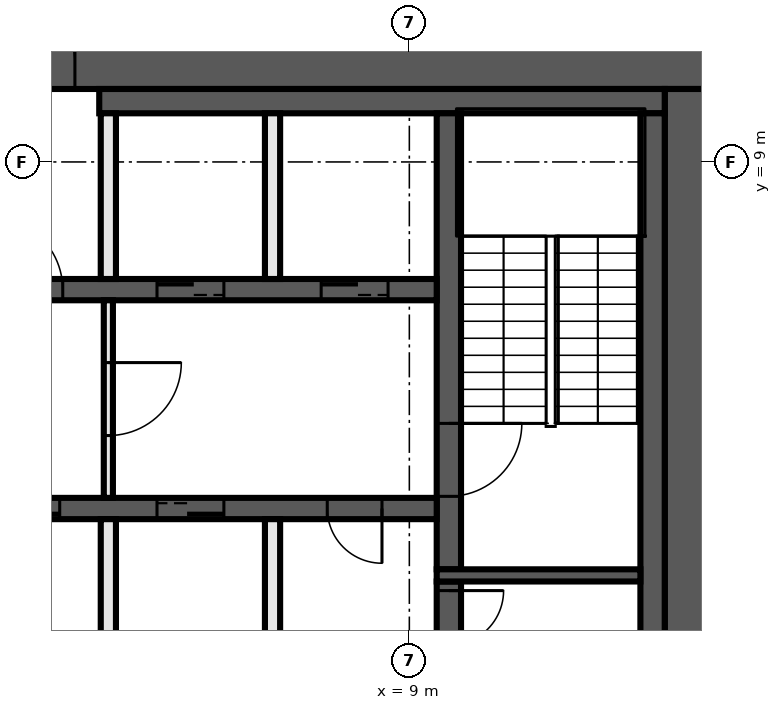
"""IFC4 building model, lengths in metres.
Left out: names, types, materials, properties, quantities, classifications, styles, units other than length and angle.
Written with IfcOpenShell. Run it as: python <this file> out.ifc"""

import sys

from ifc_helpers import new_model, si_unit, direction, frame, frame_2d, origin, place, context, subcontext, project, spatial, rectangle, extrude, element, fill, save


model = new_model("IFC4")
c1 = context("Model", 3, precision=1e-05, world=origin(), true_north=direction((0.0, 1.0)))
c2 = subcontext(c1, "Body", "Model", "MODEL_VIEW")
j1 = project(units=[si_unit("LENGTHUNIT", "METRE"), si_unit("PLANEANGLEUNIT", "RADIAN")], contexts=[c1])
p1 = place(None, origin())
s1 = spatial("IfcSite", under=j1, at=p1, CompositionType="ELEMENT")
p2 = place(p1, origin())
s2 = spatial("IfcBuilding", under=s1, at=p2, CompositionType="ELEMENT")
p3 = place(p2, frame((0.0, 0.0, 211.4)))
s3 = spatial("IfcBuildingStorey", under=s2, at=p3, CompositionType="ELEMENT", Elevation=211.4)
p4 = place(p3, frame((-14.0, 10.6, 0.0), z_axis=(0.0, 0.0, 1.0), x_axis=(1.0, 0.0, 0.0)))
e1 = element("IfcWall", 1, at=p4, inside=s3, PredefinedType="SHEAR", context=c2, shape_type="SweptSolid", body=[
    extrude(rectangle(XDim=28.0, YDim=0.8, at=frame_2d((14.0, 0.0))), origin(), (0.0, 0.0, 1.0), 3.82),
])
p5 = place(p4, frame((15.9, 0.0, 0.0)))
e2 = element("IfcOpeningElement", 2, at=p5, cuts=e1, PredefinedType="OPENING", context=c2, shape_type="SweptSolid", body=[
    extrude(rectangle(XDim=1.6, YDim=2.1, at=frame_2d((0.8, 1.05))), frame((0.0, 0.41, 0.0), z_axis=(0.0, -1.0, 0.0), x_axis=(1.0, 0.0, 0.0)), (0.0, 0.0, 1.0), 0.82),
])
p6 = place(p3, frame((13.6, 10.2, 0.0), z_axis=(0.0, 0.0, 1.0), x_axis=(0.0, -1.0, 0.0)))
e3 = element("IfcWall", 3, at=p6, inside=s3, PredefinedType="SHEAR", context=c2, shape_type="SweptSolid", body=[
    extrude(rectangle(XDim=20.4, YDim=0.8, at=frame_2d((10.2, 0.0))), origin(), (0.0, 0.0, 1.0), 3.82),
])
p7 = place(p3, frame((3.9, 10.0, 0.0), z_axis=(0.0, 0.0, 1.0), x_axis=(1.0, 0.0, 0.0)))
e4 = element("IfcWall", 4, at=p7, inside=s3, PredefinedType="SHEAR", context=c2, shape_type="SweptSolid", body=[
    extrude(rectangle(XDim=9.3, YDim=0.4, at=frame_2d((4.65, 0.0))), origin(), (0.0, 0.0, 1.0), 3.82),
])
p8 = place(p3, frame((13.0, 9.8, 0.0), z_axis=(0.0, 0.0, 1.0), x_axis=(0.0, -1.0, 0.0)))
e5 = element("IfcWall", 5, at=p8, inside=s3, PredefinedType="SHEAR", context=c2, shape_type="SweptSolid", body=[
    extrude(rectangle(XDim=19.6, YDim=0.4, at=frame_2d((9.8, 0.0))), origin(), (0.0, 0.0, 1.0), 3.82),
])
p9 = place(p3, frame((9.65, 2.1, 0.0), z_axis=(0.0, 0.0, 1.0), x_axis=(0.0, -1.0, 0.0)))
e6 = element("IfcWall", 6, at=p9, inside=s3, PredefinedType="SHEAR", context=c2, shape_type="SweptSolid", body=[
    extrude(rectangle(XDim=4.2, YDim=0.4, at=frame_2d((2.1, 0.0))), origin(), (0.0, 0.0, 1.0), 3.82),
])
p10 = place(p9, frame((0.15, 0.0, 0.0)))
e7 = element("IfcOpeningElement", 7, at=p10, cuts=e6, PredefinedType="OPENING", context=c2, shape_type="SweptSolid", body=[
    extrude(rectangle(XDim=0.9, YDim=2.1, at=frame_2d((0.45, 1.05))), frame((0.0, 0.21, 0.0), z_axis=(0.0, -1.0, 0.0), x_axis=(1.0, 0.0, 0.0)), (0.0, 0.0, 1.0), 0.42),
])
p11 = place(p3, frame((9.65, 9.8, 0.0), z_axis=(0.0, 0.0, 1.0), x_axis=(0.0, -1.0, 0.0)))
e8 = element("IfcWall", 8, at=p11, inside=s3, PredefinedType="SHEAR", context=c2, shape_type="SweptSolid", body=[
    extrude(rectangle(XDim=7.5, YDim=0.4, at=frame_2d((3.75, 0.0))), origin(), (0.0, 0.0, 1.0), 3.82),
])
p12 = place(p11, frame((5.1, 0.0, 0.0)))
e9 = element("IfcOpeningElement", 9, at=p12, cuts=e8, PredefinedType="OPENING", context=c2, shape_type="SweptSolid", body=[
    extrude(rectangle(XDim=1.2, YDim=2.1, at=frame_2d((0.6, 1.05))), frame((0.0, 0.21, 0.0), z_axis=(0.0, -1.0, 0.0), x_axis=(1.0, 0.0, 0.0)), (0.0, 0.0, 1.0), 0.42),
])
p13 = place(p3, frame((9.45, 2.2, 0.0), z_axis=(0.0, 0.0, 1.0), x_axis=(1.0, 0.0, 0.0)))
e10 = element("IfcWall", 10, at=p13, inside=s3, PredefinedType="SHEAR", context=c2, shape_type="SweptSolid", body=[
    extrude(rectangle(XDim=3.35, YDim=0.2, at=frame_2d((1.675, 0.0))), origin(), (0.0, 0.0, 1.0), 3.82),
])
p14 = place(p3, frame((-9.45, 6.9, 0.0), z_axis=(0.0, 0.0, 1.0), x_axis=(1.0, 0.0, 0.0)))
e11 = element("IfcWall", 11, at=p14, inside=s3, PredefinedType="SHEAR", context=c2, shape_type="SweptSolid", body=[
    extrude(rectangle(XDim=18.9, YDim=0.35, at=frame_2d((9.45, 0.0))), origin(), (0.0, 0.0, 1.0), 3.82),
])
p15 = place(p14, frame((11.55, 0.0, 0.0)))
e12 = element("IfcOpeningElement", 12, at=p15, cuts=e11, PredefinedType="OPENING", context=c2, shape_type="SweptSolid", body=[
    extrude(rectangle(XDim=1.2, YDim=2.1, at=frame_2d((0.6, 1.05))), frame((0.0, 0.185, 0.0), z_axis=(0.0, -1.0, 0.0), x_axis=(1.0, 0.0, 0.0)), (0.0, 0.0, 1.0), 0.37),
])
p16 = place(p14, frame((14.3, 0.0, 0.0)))
e13 = element("IfcOpeningElement", 13, at=p16, cuts=e11, PredefinedType="OPENING", context=c2, shape_type="SweptSolid", body=[
    extrude(rectangle(XDim=1.1, YDim=2.1, at=frame_2d((0.55, 1.05))), frame((0.0, 0.185, 0.0), z_axis=(0.0, -1.0, 0.0), x_axis=(1.0, 0.0, 0.0)), (0.0, 0.0, 1.0), 0.37),
])
p17 = place(p14, frame((17.0, 0.0, 0.0)))
e14 = element("IfcOpeningElement", 14, at=p17, cuts=e11, PredefinedType="OPENING", context=c2, shape_type="SweptSolid", body=[
    extrude(rectangle(XDim=1.1, YDim=2.1, at=frame_2d((0.55, 1.05))), frame((0.0, 0.185, 0.0), z_axis=(0.0, -1.0, 0.0), x_axis=(1.0, 0.0, 0.0)), (0.0, 0.0, 1.0), 0.37),
])
p18 = place(p14, frame((2.25, 0.0, 0.0)))
e15 = element("IfcOpeningElement", 15, at=p18, cuts=e11, PredefinedType="OPENING", context=c2, shape_type="SweptSolid", body=[
    extrude(rectangle(XDim=0.9, YDim=2.1, at=frame_2d((0.45, 1.05))), frame((0.0, 0.185, 0.0), z_axis=(0.0, -1.0, 0.0), x_axis=(1.0, 0.0, 0.0)), (0.0, 0.0, 1.0), 0.37),
])
p19 = place(p14, frame((6.3, 0.0, 0.0)))
e16 = element("IfcOpeningElement", 16, at=p19, cuts=e11, PredefinedType="OPENING", context=c2, shape_type="SweptSolid", body=[
    extrude(rectangle(XDim=0.9, YDim=2.1, at=frame_2d((0.45, 1.05))), frame((0.0, 0.185, 0.0), z_axis=(0.0, -1.0, 0.0), x_axis=(1.0, 0.0, 0.0)), (0.0, 0.0, 1.0), 0.37),
])
p20 = place(p14, frame((9.0, 0.0, 0.0)))
e17 = element("IfcOpeningElement", 17, at=p20, cuts=e11, PredefinedType="OPENING", context=c2, shape_type="SweptSolid", body=[
    extrude(rectangle(XDim=0.9, YDim=2.1, at=frame_2d((0.45, 1.05))), frame((0.0, 0.185, 0.0), z_axis=(0.0, -1.0, 0.0), x_axis=(1.0, 0.0, 0.0)), (0.0, 0.0, 1.0), 0.37),
])
p21 = place(p3, frame((9.45, 3.3, 0.0), z_axis=(0.0, 0.0, 1.0), x_axis=(-1.0, 0.0, 0.0)))
e18 = element("IfcWall", 18, at=p21, inside=s3, PredefinedType="SHEAR", context=c2, shape_type="SweptSolid", body=[
    extrude(rectangle(XDim=18.9, YDim=0.35, at=frame_2d((9.45, 0.0))), origin(), (0.0, 0.0, 1.0), 3.82),
])
p22 = place(p21, frame((6.2, 0.0, 0.0)))
e19 = element("IfcOpeningElement", 19, at=p22, cuts=e18, PredefinedType="OPENING", context=c2, shape_type="SweptSolid", body=[
    extrude(rectangle(XDim=1.1, YDim=2.1, at=frame_2d((0.55, 1.05))), frame((0.0, 0.185, 0.0), z_axis=(0.0, -1.0, 0.0), x_axis=(1.0, 0.0, 0.0)), (0.0, 0.0, 1.0), 0.37),
])
p23 = place(p21, frame((3.5, 0.0, 0.0)))
e20 = element("IfcOpeningElement", 20, at=p23, cuts=e18, PredefinedType="OPENING", context=c2, shape_type="SweptSolid", body=[
    extrude(rectangle(XDim=1.1, YDim=2.1, at=frame_2d((0.55, 1.05))), frame((0.0, 0.185, 0.0), z_axis=(0.0, -1.0, 0.0), x_axis=(1.0, 0.0, 0.0)), (0.0, 0.0, 1.0), 0.37),
])
p24 = place(p21, frame((0.9, 0.0, 0.0)))
e21 = element("IfcOpeningElement", 21, at=p24, cuts=e18, PredefinedType="OPENING", context=c2, shape_type="SweptSolid", body=[
    extrude(rectangle(XDim=0.9, YDim=2.1, at=frame_2d((0.45, 1.05))), frame((0.0, 0.185, 0.0), z_axis=(0.0, -1.0, 0.0), x_axis=(1.0, 0.0, 0.0)), (0.0, 0.0, 1.0), 0.37),
])
p25 = place(p21, frame((17.1, 0.0, 0.0)))
e22 = element("IfcOpeningElement", 22, at=p25, cuts=e18, PredefinedType="OPENING", context=c2, shape_type="SweptSolid", body=[
    extrude(rectangle(XDim=0.9, YDim=2.1, at=frame_2d((0.45, 1.05))), frame((0.0, 0.185, 0.0), z_axis=(0.0, -1.0, 0.0), x_axis=(1.0, 0.0, 0.0)), (0.0, 0.0, 1.0), 0.37),
])
p26 = place(p21, frame((14.4, 0.0, 0.0)))
e23 = element("IfcOpeningElement", 23, at=p26, cuts=e18, PredefinedType="OPENING", context=c2, shape_type="SweptSolid", body=[
    extrude(rectangle(XDim=0.9, YDim=2.1, at=frame_2d((0.45, 1.05))), frame((0.0, 0.185, 0.0), z_axis=(0.0, -1.0, 0.0), x_axis=(1.0, 0.0, 0.0)), (0.0, 0.0, 1.0), 0.37),
])
p27 = place(p21, frame((10.35, 0.0, 0.0)))
e24 = element("IfcOpeningElement", 24, at=p27, cuts=e18, PredefinedType="OPENING", context=c2, shape_type="SweptSolid", body=[
    extrude(rectangle(XDim=0.9, YDim=2.1, at=frame_2d((0.45, 1.05))), frame((0.0, 0.185, 0.0), z_axis=(0.0, -1.0, 0.0), x_axis=(1.0, 0.0, 0.0)), (0.0, 0.0, 1.0), 0.37),
])
for number, where, z_axis, x_axis in (
    (25, (6.75, 0.4, 0.0), (0.0, 0.0, 1.0), (0.0, 1.0, 0.0)),
    (26, (6.75, 7.075, 0.0), (0.0, 0.0, 1.0), (0.0, 1.0, 0.0)),
):
    element("IfcWall", number, at=place(p3, frame(where, z_axis=z_axis, x_axis=x_axis)), inside=s3, PredefinedType="SOLIDWALL", context=c2, shape_type="SweptSolid", body=[
        extrude(rectangle(XDim=2.725, YDim=0.25, at=frame_2d((1.363, 0.0))), origin(), (0.0, 0.0, 1.0), 3.82),
    ])
p28 = place(p3, frame((4.05, 6.725, 0.0), z_axis=(0.0, 0.0, 1.0), x_axis=(0.0, -1.0, 0.0)))
e27 = element("IfcWall", 27, at=p28, inside=s3, PredefinedType="PARTITIONING", context=c2, shape_type="SweptSolid", body=[
    extrude(rectangle(XDim=3.25, YDim=0.15, at=frame_2d((1.625, 0.0))), origin(), (0.0, 0.0, 1.0), 3.82),
])
p29 = place(p28, frame((1.025, 0.0, 0.0)))
e28 = element("IfcOpeningElement", 28, at=p29, cuts=e27, PredefinedType="OPENING", context=c2, shape_type="SweptSolid", body=[
    extrude(rectangle(XDim=1.2, YDim=2.1, at=frame_2d((0.6, 1.05))), frame((0.0, 0.085, 0.0), z_axis=(0.0, -1.0, 0.0), x_axis=(1.0, 0.0, 0.0)), (0.0, 0.0, 1.0), 0.17),
])
for number, where, z_axis, x_axis in (
    (29, (4.05, 0.4, 0.0), (0.0, 0.0, 1.0), (0.0, 1.0, 0.0)),
    (30, (4.05, 7.075, 0.0), (0.0, 0.0, 1.0), (0.0, 1.0, 0.0)),
):
    element("IfcWall", number, at=place(p3, frame(where, z_axis=z_axis, x_axis=x_axis)), inside=s3, PredefinedType="SOLIDWALL", context=c2, shape_type="SweptSolid", body=[
        extrude(rectangle(XDim=2.725, YDim=0.25, at=frame_2d((1.363, 0.0))), origin(), (0.0, 0.0, 1.0), 3.82),
    ])
p30 = place(p10, origin())
e31 = element("IfcDoor", 31, at=p30, inside=s3, OperationType="SINGLE_SWING_RIGHT", PredefinedType="DOOR", context=c2, shape_type="SweptSolid", body=[
    extrude(rectangle(XDim=0.9, YDim=2.1, at=frame_2d((0.45, 1.05))), frame((0.0, 0.025, 0.0), z_axis=(0.0, -1.0, 0.0), x_axis=(1.0, 0.0, 0.0)), (0.0, 0.0, 1.0), 0.05),
])
fill(e7, e31)
p31 = place(p5, origin())
e32 = element("IfcDoor", 32, at=p31, inside=s3, OperationType="DOUBLE_DOOR_SINGLE_SWING", PredefinedType="DOOR", context=c2, shape_type="SweptSolid", body=[
    extrude(rectangle(XDim=1.6, YDim=2.1, at=frame_2d((0.8, 1.05))), frame((0.0, 0.025, 0.0), z_axis=(0.0, -1.0, 0.0), x_axis=(1.0, 0.0, 0.0)), (0.0, 0.0, 1.0), 0.05),
])
fill(e2, e32)
p32 = place(p15, origin())
e33 = element("IfcDoor", 33, at=p32, inside=s3, OperationType="SINGLE_SWING_LEFT", PredefinedType="DOOR", context=c2, shape_type="SweptSolid", body=[
    extrude(rectangle(XDim=1.2, YDim=2.1, at=frame_2d((0.6, 1.05))), frame((0.0, 0.025, 0.0), z_axis=(0.0, -1.0, 0.0), x_axis=(1.0, 0.0, 0.0)), (0.0, 0.0, 1.0), 0.05),
])
fill(e12, e33)
p33 = place(p16, origin())
e34 = element("IfcDoor", 34, at=p33, inside=s3, OperationType="DOUBLE_DOOR_SLIDING", PredefinedType="DOOR", context=c2, shape_type="SweptSolid", body=[
    extrude(rectangle(XDim=1.1, YDim=2.1, at=frame_2d((0.55, 1.05))), frame((0.0, 0.025, 0.0), z_axis=(0.0, -1.0, 0.0), x_axis=(1.0, 0.0, 0.0)), (0.0, 0.0, 1.0), 0.05),
])
fill(e13, e34)
p34 = place(p17, origin())
e35 = element("IfcDoor", 35, at=p34, inside=s3, OperationType="DOUBLE_DOOR_SLIDING", PredefinedType="DOOR", context=c2, shape_type="SweptSolid", body=[
    extrude(rectangle(XDim=1.1, YDim=2.1, at=frame_2d((0.55, 1.05))), frame((0.0, 0.025, 0.0), z_axis=(0.0, -1.0, 0.0), x_axis=(1.0, 0.0, 0.0)), (0.0, 0.0, 1.0), 0.05),
])
fill(e14, e35)
p35 = place(p22, origin())
e36 = element("IfcDoor", 36, at=p35, inside=s3, OperationType="DOUBLE_DOOR_SLIDING", PredefinedType="DOOR", context=c2, shape_type="SweptSolid", body=[
    extrude(rectangle(XDim=1.1, YDim=2.1, at=frame_2d((0.55, 1.05))), frame((0.0, 0.025, 0.0), z_axis=(0.0, -1.0, 0.0), x_axis=(1.0, 0.0, 0.0)), (0.0, 0.0, 1.0), 0.05),
])
fill(e19, e36)
p36 = place(p23, origin())
e37 = element("IfcDoor", 37, at=p36, inside=s3, OperationType="DOUBLE_DOOR_SLIDING", PredefinedType="DOOR", context=c2, shape_type="SweptSolid", body=[
    extrude(rectangle(XDim=1.1, YDim=2.1, at=frame_2d((0.55, 1.05))), frame((0.0, 0.025, 0.0), z_axis=(0.0, -1.0, 0.0), x_axis=(1.0, 0.0, 0.0)), (0.0, 0.0, 1.0), 0.05),
])
fill(e20, e37)
p37 = place(p24, origin())
e38 = element("IfcDoor", 38, at=p37, inside=s3, OperationType="SINGLE_SWING_LEFT", PredefinedType="DOOR", context=c2, shape_type="SweptSolid", body=[
    extrude(rectangle(XDim=0.9, YDim=2.1, at=frame_2d((0.45, 1.05))), frame((0.0, 0.025, 0.0), z_axis=(0.0, -1.0, 0.0), x_axis=(1.0, 0.0, 0.0)), (0.0, 0.0, 1.0), 0.05),
])
fill(e21, e38)
p38 = place(p12, origin())
e39 = element("IfcDoor", 39, at=p38, inside=s3, OperationType="SINGLE_SWING_LEFT", PredefinedType="DOOR", context=c2, shape_type="SweptSolid", body=[
    extrude(rectangle(XDim=1.2, YDim=2.1, at=frame_2d((0.6, 1.05))), frame((0.0, 0.025, 0.0), z_axis=(0.0, -1.0, 0.0), x_axis=(1.0, 0.0, 0.0)), (0.0, 0.0, 1.0), 0.05),
])
fill(e9, e39)
p39 = place(p29, origin())
e40 = element("IfcDoor", 40, at=p39, inside=s3, OperationType="SINGLE_SWING_RIGHT", PredefinedType="DOOR", context=c2, shape_type="SweptSolid", body=[
    extrude(rectangle(XDim=1.2, YDim=2.1, at=frame_2d((0.6, 1.05))), frame((0.0, 0.025, 0.0), z_axis=(0.0, -1.0, 0.0), x_axis=(1.0, 0.0, 0.0)), (0.0, 0.0, 1.0), 0.05),
])
fill(e28, e40)
save(model, sys.argv[1])
